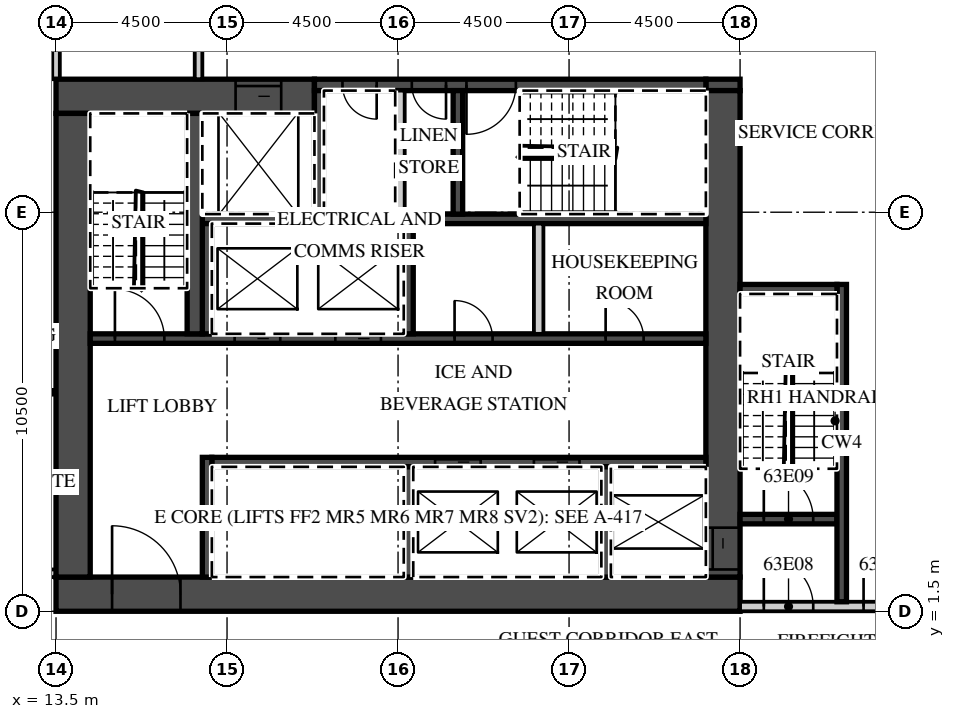
"""IFC4 building model, lengths in metres.
Left out: names, types, materials, properties, quantities, classifications, styles, units other than length and angle.
Written with IfcOpenShell. Run it as: python <this file> out.ifc"""

import sys

from ifc_helpers import new_model, si_unit, direction, frame, frame_2d, origin, place, context, subcontext, project, spatial, rectangle, extrude, element, fill, save


model = new_model("IFC4")
c1 = context("Model", 3, precision=1e-05, world=origin(), true_north=direction((0.0, 1.0)))
c2 = subcontext(c1, "Body", "Model", "MODEL_VIEW")
j1 = project(units=[si_unit("LENGTHUNIT", "METRE"), si_unit("PLANEANGLEUNIT", "RADIAN")], contexts=[c1])
p1 = place(None, origin())
s1 = spatial("IfcSite", under=j1, at=p1, CompositionType="ELEMENT")
p2 = place(p1, origin())
s2 = spatial("IfcBuilding", under=s1, at=p2, CompositionType="ELEMENT")
p3 = place(p2, frame((0.0, 0.0, 254.0)))
s3 = spatial("IfcBuildingStorey", under=s2, at=p3, CompositionType="ELEMENT", Elevation=254.0)
p4 = place(p3, frame((13.5, 15.5, 0.0), z_axis=(0.0, 0.0, 1.0), x_axis=(0.0, 1.0, 0.0)))
e1 = element("IfcWall", 1, at=p4, inside=s3, PredefinedType="PARTITIONING", context=c2, shape_type="SweptSolid", body=[
    extrude(rectangle(XDim=5.436, YDim=0.2, at=frame_2d((2.718, 0.0))), origin(), (0.0, 0.0, 1.0), 3.0),
])
p5 = place(p3, frame((-13.5, 2.5, 0.0), z_axis=(0.0, 0.0, 1.0), x_axis=(1.0, 0.0, 0.0)))
e2 = element("IfcWall", 2, at=p5, inside=s3, PredefinedType="PARTITIONING", context=c2, shape_type="SweptSolid", body=[
    extrude(rectangle(XDim=27.0, YDim=0.2, at=frame_2d((13.5, 0.0))), origin(), (0.0, 0.0, 1.0), 3.0),
])
p6 = place(p5, frame((0.575, 0.0, 0.0)))
e3 = element("IfcOpeningElement", 3, at=p6, cuts=e2, PredefinedType="OPENING", context=c2, shape_type="SweptSolid", body=[
    extrude(rectangle(XDim=1.0, YDim=2.1, at=frame_2d((0.5, 1.05))), frame((0.0, 0.11, 0.0), z_axis=(0.0, -1.0, 0.0), x_axis=(1.0, 0.0, 0.0)), (0.0, 0.0, 1.0), 0.22),
])
p7 = place(p5, frame((7.45, 0.0, 0.0)))
e4 = element("IfcOpeningElement", 4, at=p7, cuts=e2, PredefinedType="OPENING", context=c2, shape_type="SweptSolid", body=[
    extrude(rectangle(XDim=1.0, YDim=2.1, at=frame_2d((0.5, 1.05))), frame((0.0, 0.11, 0.0), z_axis=(0.0, -1.0, 0.0), x_axis=(1.0, 0.0, 0.0)), (0.0, 0.0, 1.0), 0.22),
])
p8 = place(p5, frame((11.925, 0.0, 0.0)))
e5 = element("IfcOpeningElement", 5, at=p8, cuts=e2, PredefinedType="OPENING", context=c2, shape_type="SweptSolid", body=[
    extrude(rectangle(XDim=1.0, YDim=2.1, at=frame_2d((0.5, 1.05))), frame((0.0, 0.11, 0.0), z_axis=(0.0, -1.0, 0.0), x_axis=(1.0, 0.0, 0.0)), (0.0, 0.0, 1.0), 0.22),
])
p9 = place(p5, frame((18.862, 0.0, 0.0)))
e6 = element("IfcOpeningElement", 6, at=p9, cuts=e2, PredefinedType="OPENING", context=c2, shape_type="SweptSolid", body=[
    extrude(rectangle(XDim=1.2, YDim=2.1, at=frame_2d((0.6, 1.05))), frame((0.0, 0.11, 0.0), z_axis=(0.0, -1.0, 0.0), x_axis=(1.0, 0.0, 0.0)), (0.0, 0.0, 1.0), 0.22),
])
p10 = place(p5, frame((23.075, 0.0, 0.0)))
e7 = element("IfcOpeningElement", 7, at=p10, cuts=e2, PredefinedType="OPENING", context=c2, shape_type="SweptSolid", body=[
    extrude(rectangle(XDim=1.0, YDim=2.1, at=frame_2d((0.5, 1.05))), frame((0.0, 0.11, 0.0), z_axis=(0.0, -1.0, 0.0), x_axis=(1.0, 0.0, 0.0)), (0.0, 0.0, 1.0), 0.22),
])
p11 = place(p3, frame((13.5, 1.95, 0.0), z_axis=(0.0, 0.0, 1.0), x_axis=(1.0, 0.0, 0.0)))
e8 = element("IfcWall", 8, at=p11, inside=s3, PredefinedType="SHEAR", context=c2, shape_type="SweptSolid", body=[
    extrude(rectangle(XDim=18.0, YDim=0.9, at=frame_2d((9.0, 0.0))), origin(), (0.0, 0.0, 1.0), 3.0),
])
p12 = place(p11, frame((1.475, 0.0, 0.0)))
e9 = element("IfcOpeningElement", 9, at=p12, cuts=e8, PredefinedType="OPENING", context=c2, shape_type="SweptSolid", body=[
    extrude(rectangle(XDim=1.8, YDim=2.1, at=frame_2d((0.9, 1.05))), frame((0.0, 0.46, 0.0), z_axis=(0.0, -1.0, 0.0), x_axis=(1.0, 0.0, 0.0)), (0.0, 0.0, 1.0), 0.92),
])
p13 = place(p3, frame((13.5, 15.05, 0.0), z_axis=(0.0, 0.0, 1.0), x_axis=(1.0, 0.0, 0.0)))
e10 = element("IfcWall", 10, at=p13, inside=s3, PredefinedType="SHEAR", context=c2, shape_type="SweptSolid", body=[
    extrude(rectangle(XDim=6.8, YDim=0.9, at=frame_2d((3.4, 0.0))), origin(), (0.0, 0.0, 1.0), 3.0),
])
p14 = place(p13, frame((4.725, 0.0, 0.0)))
e11 = element("IfcOpeningElement", 11, at=p14, cuts=e10, PredefinedType="OPENING", context=c2, shape_type="SweptSolid", body=[
    extrude(rectangle(XDim=1.2, YDim=2.1, at=frame_2d((0.6, 1.05))), frame((0.0, 0.46, 0.0), z_axis=(0.0, -1.0, 0.0), x_axis=(1.0, 0.0, 0.0)), (0.0, 0.0, 1.0), 0.92),
])
p15 = place(p3, frame((30.6, 15.35, 0.0), z_axis=(0.0, 0.0, 1.0), x_axis=(1.0, 0.0, 0.0)))
e12 = element("IfcWall", 12, at=p15, inside=s3, PredefinedType="SHEAR", context=c2, shape_type="SweptSolid", body=[
    extrude(rectangle(XDim=0.9, YDim=0.3, at=frame_2d((0.45, 0.0))), origin(), (0.0, 0.0, 1.0), 3.0),
])
p16 = place(p3, frame((20.3, 15.35, 0.0), z_axis=(0.0, 0.0, 1.0), x_axis=(1.0, 0.0, 0.0)))
e13 = element("IfcWall", 13, at=p16, inside=s3, PredefinedType="SHEAR", context=c2, shape_type="SweptSolid", body=[
    extrude(rectangle(XDim=10.3, YDim=0.3, at=frame_2d((5.15, 0.0))), origin(), (0.0, 0.0, 1.0), 3.0),
])
p17 = place(p16, frame((4.0, 0.0, 0.0)))
e14 = element("IfcOpeningElement", 14, at=p17, cuts=e13, PredefinedType="OPENING", context=c2, shape_type="SweptSolid", body=[
    extrude(rectangle(XDim=1.3, YDim=2.1, at=frame_2d((0.65, 1.05))), frame((0.0, 0.16, 0.0), z_axis=(0.0, -1.0, 0.0), x_axis=(1.0, 0.0, 0.0)), (0.0, 0.0, 1.0), 0.32),
])
p18 = place(p16, frame((2.562, 0.0, 0.0)))
e15 = element("IfcOpeningElement", 15, at=p18, cuts=e13, PredefinedType="OPENING", context=c2, shape_type="SweptSolid", body=[
    extrude(rectangle(XDim=0.9, YDim=2.1, at=frame_2d((0.45, 1.05))), frame((0.0, 0.16, 0.0), z_axis=(0.0, -1.0, 0.0), x_axis=(1.0, 0.0, 0.0)), (0.0, 0.0, 1.0), 0.32),
])
p19 = place(p16, frame((0.738, 0.0, 0.0)))
e16 = element("IfcOpeningElement", 16, at=p19, cuts=e13, PredefinedType="OPENING", context=c2, shape_type="SweptSolid", body=[
    extrude(rectangle(XDim=0.9, YDim=2.1, at=frame_2d((0.45, 1.05))), frame((0.0, 0.16, 0.0), z_axis=(0.0, -1.0, 0.0), x_axis=(1.0, 0.0, 0.0)), (0.0, 0.0, 1.0), 0.32),
])
p20 = place(p3, frame((31.05, 2.4, 0.0), z_axis=(0.0, 0.0, 1.0), x_axis=(0.0, 1.0, 0.0)))
e17 = element("IfcWall", 17, at=p20, inside=s3, PredefinedType="SHEAR", context=c2, shape_type="SweptSolid", body=[
    extrude(rectangle(XDim=12.8, YDim=0.9, at=frame_2d((6.4, 0.0))), origin(), (0.0, 0.0, 1.0), 3.0),
])
p21 = place(p20, frame((0.2, 0.0, 0.0)))
e18 = element("IfcOpeningElement", 18, at=p21, cuts=e17, PredefinedType="OPENING", context=c2, shape_type="SweptSolid", body=[
    extrude(rectangle(XDim=1.1, YDim=2.1, at=frame_2d((0.55, 1.05))), frame((0.0, 0.46, 0.0), z_axis=(0.0, -1.0, 0.0), x_axis=(1.0, 0.0, 0.0)), (0.0, 0.0, 1.0), 0.92),
])
p22 = place(p3, frame((13.95, 2.4, 0.0), z_axis=(0.0, 0.0, 1.0), x_axis=(0.0, 1.0, 0.0)))
e19 = element("IfcWall", 19, at=p22, inside=s3, PredefinedType="SHEAR", context=c2, shape_type="SweptSolid", body=[
    extrude(rectangle(XDim=12.2, YDim=0.9, at=frame_2d((6.1, 0.0))), origin(), (0.0, 0.0, 1.0), 3.0),
])
p23 = place(p3, frame((17.6, 5.425, 0.0), z_axis=(0.0, 0.0, 1.0), x_axis=(1.0, 0.0, 0.0)))
e20 = element("IfcWall", 20, at=p23, inside=s3, PredefinedType="SHEAR", context=c2, shape_type="SweptSolid", body=[
    extrude(rectangle(XDim=13.0, YDim=0.25, at=frame_2d((6.5, 0.0))), origin(), (0.0, 0.0, 1.0), 3.0),
])
p24 = place(p23, frame((8.475, 0.0, 0.0)))
e21 = element("IfcOpeningElement", 21, at=p24, cuts=e20, PredefinedType="OPENING", context=c2, shape_type="SweptSolid", body=[
    extrude(rectangle(XDim=1.2, YDim=2.1, at=frame_2d((0.6, 1.05))), frame((0.0, 0.135, 0.0), z_axis=(0.0, -1.0, 0.0), x_axis=(1.0, 0.0, 0.0)), (0.0, 0.0, 1.0), 0.27),
])
p25 = place(p23, frame((5.875, 0.0, 0.0)))
e22 = element("IfcOpeningElement", 22, at=p25, cuts=e20, PredefinedType="OPENING", context=c2, shape_type="SweptSolid", body=[
    extrude(rectangle(XDim=1.2, YDim=2.1, at=frame_2d((0.6, 1.05))), frame((0.0, 0.135, 0.0), z_axis=(0.0, -1.0, 0.0), x_axis=(1.0, 0.0, 0.0)), (0.0, 0.0, 1.0), 0.27),
])
p26 = place(p3, frame((17.475, 2.4, 0.0), z_axis=(0.0, 0.0, 1.0), x_axis=(0.0, 1.0, 0.0)))
e23 = element("IfcWall", 23, at=p26, inside=s3, PredefinedType="SHEAR", context=c2, shape_type="SweptSolid", body=[
    extrude(rectangle(XDim=3.15, YDim=0.25, at=frame_2d((1.575, 0.0))), origin(), (0.0, 0.0, 1.0), 3.0),
])
for number, where, z_axis, x_axis in (
    (24, (27.975, 2.4, 0.0), (0.0, 0.0, 1.0), (0.0, 1.0, 0.0)),
    (25, (22.775, 2.4, 0.0), (0.0, 0.0, 1.0), (0.0, 1.0, 0.0)),
):
    element("IfcWall", number, at=place(p3, frame(where, z_axis=z_axis, x_axis=x_axis)), inside=s3, PredefinedType="SHEAR", context=c2, shape_type="SweptSolid", body=[
        extrude(rectangle(XDim=2.9, YDim=0.25, at=frame_2d((1.45, 0.0))), origin(), (0.0, 0.0, 1.0), 3.0),
    ])
p27 = place(p3, frame((14.4, 8.675, 0.0), z_axis=(0.0, 0.0, 1.0), x_axis=(1.0, 0.0, 0.0)))
e26 = element("IfcWall", 26, at=p27, inside=s3, PredefinedType="SHEAR", context=c2, shape_type="SweptSolid", body=[
    extrude(rectangle(XDim=16.2, YDim=0.25, at=frame_2d((8.1, 0.0))), origin(), (0.0, 0.0, 1.0), 3.0),
])
p28 = place(p27, frame((6.45, 0.0, 0.0)))
e27 = element("IfcOpeningElement", 27, at=p28, cuts=e26, PredefinedType="OPENING", context=c2, shape_type="SweptSolid", body=[
    extrude(rectangle(XDim=1.2, YDim=2.1, at=frame_2d((0.6, 1.05))), frame((0.0, 0.135, 0.0), z_axis=(0.0, -1.0, 0.0), x_axis=(1.0, 0.0, 0.0)), (0.0, 0.0, 1.0), 0.27),
])
p29 = place(p27, frame((3.8, 0.0, 0.0)))
e28 = element("IfcOpeningElement", 28, at=p29, cuts=e26, PredefinedType="OPENING", context=c2, shape_type="SweptSolid", body=[
    extrude(rectangle(XDim=1.2, YDim=2.1, at=frame_2d((0.6, 1.05))), frame((0.0, 0.135, 0.0), z_axis=(0.0, -1.0, 0.0), x_axis=(1.0, 0.0, 0.0)), (0.0, 0.0, 1.0), 0.27),
])
p30 = place(p27, frame((0.65, 0.0, 0.0)))
e29 = element("IfcOpeningElement", 29, at=p30, cuts=e26, PredefinedType="OPENING", context=c2, shape_type="SweptSolid", body=[
    extrude(rectangle(XDim=1.3, YDim=2.1, at=frame_2d((0.65, 1.05))), frame((0.0, 0.135, 0.0), z_axis=(0.0, -1.0, 0.0), x_axis=(1.0, 0.0, 0.0)), (0.0, 0.0, 1.0), 0.27),
])
p31 = place(p27, frame((13.562, 0.0, 0.0)))
e30 = element("IfcOpeningElement", 30, at=p31, cuts=e26, PredefinedType="OPENING", context=c2, shape_type="SweptSolid", body=[
    extrude(rectangle(XDim=1.0, YDim=2.1, at=frame_2d((0.5, 1.05))), frame((0.0, 0.135, 0.0), z_axis=(0.0, -1.0, 0.0), x_axis=(1.0, 0.0, 0.0)), (0.0, 0.0, 1.0), 0.27),
])
p32 = place(p27, frame((9.587, 0.0, 0.0)))
e31 = element("IfcOpeningElement", 31, at=p32, cuts=e26, PredefinedType="OPENING", context=c2, shape_type="SweptSolid", body=[
    extrude(rectangle(XDim=1.0, YDim=2.1, at=frame_2d((0.5, 1.05))), frame((0.0, 0.135, 0.0), z_axis=(0.0, -1.0, 0.0), x_axis=(1.0, 0.0, 0.0)), (0.0, 0.0, 1.0), 0.27),
])
p33 = place(p3, frame((17.35, 11.825, 0.0), z_axis=(0.0, 0.0, 1.0), x_axis=(1.0, 0.0, 0.0)))
e32 = element("IfcWall", 32, at=p33, inside=s3, PredefinedType="SHEAR", context=c2, shape_type="SweptSolid", body=[
    extrude(rectangle(XDim=13.25, YDim=0.25, at=frame_2d((6.625, 0.0))), origin(), (0.0, 0.0, 1.0), 3.0),
])
for number, where, z_axis, x_axis in (
    (33, (17.475, 8.8, 0.0), (0.0, 0.0, 1.0), (0.0, 1.0, 0.0)),
    (34, (22.775, 8.8, 0.0), (0.0, 0.0, 1.0), (0.0, 1.0, 0.0)),
):
    element("IfcWall", number, at=place(p3, frame(where, z_axis=z_axis, x_axis=x_axis)), inside=s3, PredefinedType="SHEAR", context=c2, shape_type="SweptSolid", body=[
        extrude(rectangle(XDim=2.9, YDim=0.25, at=frame_2d((1.45, 0.0))), origin(), (0.0, 0.0, 1.0), 3.0),
    ])
p34 = place(p3, frame((26.2, 8.8, 0.0), z_axis=(0.0, 0.0, 1.0), x_axis=(0.0, 1.0, 0.0)))
e35 = element("IfcWall", 35, at=p34, inside=s3, PredefinedType="PARTITIONING", context=c2, shape_type="SweptSolid", body=[
    extrude(rectangle(XDim=2.9, YDim=0.25, at=frame_2d((1.45, 0.0))), origin(), (0.0, 0.0, 1.0), 3.0),
])
p35 = place(p3, frame((17.15, 8.8, 0.0), z_axis=(0.0, 0.0, 1.0), x_axis=(0.0, 1.0, 0.0)))
e36 = element("IfcWall", 36, at=p35, inside=s3, PredefinedType="SHEAR", context=c2, shape_type="SweptSolid", body=[
    extrude(rectangle(XDim=5.8, YDim=0.4, at=frame_2d((2.9, 0.0))), origin(), (0.0, 0.0, 1.0), 3.0),
])
for number, where, z_axis, x_axis in (
    (37, (20.425, 11.95, 0.0), (0.0, 0.0, 1.0), (0.0, 1.0, 0.0)),
    (38, (24.075, 11.95, 0.0), (0.0, 0.0, 1.0), (0.0, 1.0, 0.0)),
):
    element("IfcWall", number, at=place(p3, frame(where, z_axis=z_axis, x_axis=x_axis)), inside=s3, PredefinedType="SHEAR", context=c2, shape_type="SweptSolid", body=[
        extrude(rectangle(XDim=3.25, YDim=0.25, at=frame_2d((1.625, 0.0))), origin(), (0.0, 0.0, 1.0), 3.0),
    ])
p36 = place(p3, frame((22.55, 11.95, 0.0), z_axis=(0.0, 0.0, 1.0), x_axis=(0.0, 1.0, 0.0)))
e39 = element("IfcWall", 39, at=p36, inside=s3, PredefinedType="PARTITIONING", context=c2, shape_type="SweptSolid", body=[
    extrude(rectangle(XDim=3.25, YDim=0.25, at=frame_2d((1.625, 0.0))), origin(), (0.0, 0.0, 1.0), 3.0),
])
p37 = place(p3, frame((31.5, 1.625, 0.0), z_axis=(0.0, 0.0, 1.0), x_axis=(1.0, 0.0, 0.0)))
e40 = element("IfcWall", 40, at=p37, inside=s3, PredefinedType="PARTITIONING", context=c2, shape_type="SweptSolid", body=[
    extrude(rectangle(XDim=11.04, YDim=0.25, at=frame_2d((5.52, 0.0))), origin(), (0.0, 0.0, 1.0), 3.0),
])
p38 = place(p37, frame((0.625, 0.0, 0.0)))
e41 = element("IfcOpeningElement", 41, at=p38, cuts=e40, PredefinedType="OPENING", context=c2, shape_type="SweptSolid", body=[
    extrude(rectangle(XDim=1.3, YDim=2.1, at=frame_2d((0.65, 1.05))), frame((0.0, 0.135, 0.0), z_axis=(0.0, -1.0, 0.0), x_axis=(1.0, 0.0, 0.0)), (0.0, 0.0, 1.0), 0.27),
])
p39 = place(p37, frame((3.25, 0.0, 0.0)))
e42 = element("IfcOpeningElement", 42, at=p39, cuts=e40, PredefinedType="OPENING", context=c2, shape_type="SweptSolid", body=[
    extrude(rectangle(XDim=1.1, YDim=2.1, at=frame_2d((0.55, 1.05))), frame((0.0, 0.135, 0.0), z_axis=(0.0, -1.0, 0.0), x_axis=(1.0, 0.0, 0.0)), (0.0, 0.0, 1.0), 0.27),
])
p40 = place(p3, frame((31.5, 3.925, 0.0), z_axis=(0.0, 0.0, 1.0), x_axis=(1.0, 0.0, 0.0)))
e43 = element("IfcWall", 43, at=p40, inside=s3, PredefinedType="SHEAR", context=c2, shape_type="SweptSolid", body=[
    extrude(rectangle(XDim=2.55, YDim=0.25, at=frame_2d((1.275, 0.0))), origin(), (0.0, 0.0, 1.0), 3.0),
])
p41 = place(p40, frame((0.625, 0.0, 0.0)))
e44 = element("IfcOpeningElement", 44, at=p41, cuts=e43, PredefinedType="OPENING", context=c2, shape_type="SweptSolid", body=[
    extrude(rectangle(XDim=1.3, YDim=2.1, at=frame_2d((0.65, 1.05))), frame((0.0, 0.135, 0.0), z_axis=(0.0, -1.0, 0.0), x_axis=(1.0, 0.0, 0.0)), (0.0, 0.0, 1.0), 0.27),
])
p42 = place(p3, frame((34.175, 1.75, 0.0), z_axis=(0.0, 0.0, 1.0), x_axis=(0.0, 1.0, 0.0)))
e45 = element("IfcWall", 45, at=p42, inside=s3, PredefinedType="SHEAR", context=c2, shape_type="SweptSolid", body=[
    extrude(rectangle(XDim=8.35, YDim=0.25, at=frame_2d((4.175, 0.0))), origin(), (0.0, 0.0, 1.0), 3.0),
])
p43 = place(p3, frame((31.5, 9.975, 0.0), z_axis=(0.0, 0.0, 1.0), x_axis=(1.0, 0.0, 0.0)))
e46 = element("IfcWall", 46, at=p43, inside=s3, PredefinedType="SHEAR", context=c2, shape_type="SweptSolid", body=[
    extrude(rectangle(XDim=2.55, YDim=0.25, at=frame_2d((1.275, 0.0))), origin(), (0.0, 0.0, 1.0), 3.0),
])
p44 = place(p3, frame((17.25, 15.5, 0.0), z_axis=(0.0, 0.0, 1.0), x_axis=(0.0, 1.0, 0.0)))
e47 = element("IfcWall", 47, at=p44, inside=s3, PredefinedType="PARTITIONING", context=c2, shape_type="SweptSolid", body=[
    extrude(rectangle(XDim=2.2, YDim=0.2, at=frame_2d((1.1, 0.0))), origin(), (0.0, 0.0, 1.0), 3.0),
])
p45 = place(p28, origin())
e48 = element("IfcDoor", 48, at=p45, inside=s3, OperationType="SLIDING_TO_LEFT", PredefinedType="DOOR", context=c2, shape_type="SweptSolid", body=[
    extrude(rectangle(XDim=1.2, YDim=2.1, at=frame_2d((0.6, 1.05))), frame((0.0, 0.025, 0.0), z_axis=(0.0, -1.0, 0.0), x_axis=(1.0, 0.0, 0.0)), (0.0, 0.0, 1.0), 0.05),
])
fill(e27, e48)
p46 = place(p29, origin())
e49 = element("IfcDoor", 49, at=p46, inside=s3, OperationType="SLIDING_TO_RIGHT", PredefinedType="DOOR", context=c2, shape_type="SweptSolid", body=[
    extrude(rectangle(XDim=1.2, YDim=2.1, at=frame_2d((0.6, 1.05))), frame((0.0, 0.025, 0.0), z_axis=(0.0, -1.0, 0.0), x_axis=(1.0, 0.0, 0.0)), (0.0, 0.0, 1.0), 0.05),
])
fill(e28, e49)
p47 = place(p24, origin())
e50 = element("IfcDoor", 50, at=p47, inside=s3, OperationType="SLIDING_TO_LEFT", PredefinedType="DOOR", context=c2, shape_type="SweptSolid", body=[
    extrude(rectangle(XDim=1.2, YDim=2.1, at=frame_2d((0.6, 1.05))), frame((0.0, 0.025, 0.0), z_axis=(0.0, -1.0, 0.0), x_axis=(1.0, 0.0, 0.0)), (0.0, 0.0, 1.0), 0.05),
])
fill(e21, e50)
p48 = place(p25, origin())
e51 = element("IfcDoor", 51, at=p48, inside=s3, OperationType="SLIDING_TO_RIGHT", PredefinedType="DOOR", context=c2, shape_type="SweptSolid", body=[
    extrude(rectangle(XDim=1.2, YDim=2.1, at=frame_2d((0.6, 1.05))), frame((0.0, 0.025, 0.0), z_axis=(0.0, -1.0, 0.0), x_axis=(1.0, 0.0, 0.0)), (0.0, 0.0, 1.0), 0.05),
])
fill(e22, e51)
p49 = place(p14, origin())
e52 = element("IfcDoor", 52, at=p49, inside=s3, OperationType="SLIDING_TO_LEFT", PredefinedType="DOOR", context=c2, shape_type="SweptSolid", body=[
    extrude(rectangle(XDim=1.2, YDim=2.1, at=frame_2d((0.6, 1.05))), frame((0.0, 0.025, 0.0), z_axis=(0.0, -1.0, 0.0), x_axis=(1.0, 0.0, 0.0)), (0.0, 0.0, 1.0), 0.05),
])
fill(e11, e52)
p50 = place(p21, origin())
e53 = element("IfcDoor", 53, at=p50, inside=s3, OperationType="SLIDING_TO_LEFT", PredefinedType="DOOR", context=c2, shape_type="SweptSolid", body=[
    extrude(rectangle(XDim=1.1, YDim=2.1, at=frame_2d((0.55, 1.05))), frame((0.0, 0.025, 0.0), z_axis=(0.0, -1.0, 0.0), x_axis=(1.0, 0.0, 0.0)), (0.0, 0.0, 1.0), 0.05),
])
fill(e18, e53)
p51 = place(p12, origin())
e54 = element("IfcDoor", 54, at=p51, inside=s3, OperationType="DOUBLE_DOOR_DOUBLE_SWING", PredefinedType="DOOR", context=c2, shape_type="SweptSolid", body=[
    extrude(rectangle(XDim=1.8, YDim=2.1, at=frame_2d((0.9, 1.05))), frame((0.0, 0.025, 0.0), z_axis=(0.0, -1.0, 0.0), x_axis=(1.0, 0.0, 0.0)), (0.0, 0.0, 1.0), 0.05),
])
fill(e9, e54)
p52 = place(p38, origin())
e55 = element("IfcDoor", 55, at=p52, inside=s3, OperationType="SINGLE_SWING_LEFT", PredefinedType="DOOR", context=c2, shape_type="SweptSolid", body=[
    extrude(rectangle(XDim=1.3, YDim=2.1, at=frame_2d((0.65, 1.05))), frame((0.0, 0.025, 0.0), z_axis=(0.0, -1.0, 0.0), x_axis=(1.0, 0.0, 0.0)), (0.0, 0.0, 1.0), 0.05),
])
fill(e41, e55)
p53 = place(p41, origin())
e56 = element("IfcDoor", 56, at=p53, inside=s3, OperationType="SINGLE_SWING_LEFT", PredefinedType="DOOR", context=c2, shape_type="SweptSolid", body=[
    extrude(rectangle(XDim=1.3, YDim=2.1, at=frame_2d((0.65, 1.05))), frame((0.0, 0.025, 0.0), z_axis=(0.0, -1.0, 0.0), x_axis=(1.0, 0.0, 0.0)), (0.0, 0.0, 1.0), 0.05),
])
fill(e44, e56)
p54 = place(p39, origin())
e57 = element("IfcDoor", 57, at=p54, inside=s3, OperationType="SINGLE_SWING_LEFT", PredefinedType="DOOR", context=c2, shape_type="SweptSolid", body=[
    extrude(rectangle(XDim=1.1, YDim=2.1, at=frame_2d((0.55, 1.05))), frame((0.0, 0.025, 0.0), z_axis=(0.0, -1.0, 0.0), x_axis=(1.0, 0.0, 0.0)), (0.0, 0.0, 1.0), 0.05),
])
fill(e42, e57)
p55 = place(p30, origin())
e58 = element("IfcDoor", 58, at=p55, inside=s3, OperationType="SINGLE_SWING_LEFT", PredefinedType="DOOR", context=c2, shape_type="SweptSolid", body=[
    extrude(rectangle(XDim=1.3, YDim=2.1, at=frame_2d((0.65, 1.05))), frame((0.0, 0.025, 0.0), z_axis=(0.0, -1.0, 0.0), x_axis=(1.0, 0.0, 0.0)), (0.0, 0.0, 1.0), 0.05),
])
fill(e29, e58)
p56 = place(p17, origin())
e59 = element("IfcDoor", 59, at=p56, inside=s3, OperationType="SINGLE_SWING_LEFT", PredefinedType="DOOR", context=c2, shape_type="SweptSolid", body=[
    extrude(rectangle(XDim=1.3, YDim=2.1, at=frame_2d((0.65, 1.05))), frame((0.0, 0.025, 0.0), z_axis=(0.0, -1.0, 0.0), x_axis=(1.0, 0.0, 0.0)), (0.0, 0.0, 1.0), 0.05),
])
fill(e14, e59)
p57 = place(p18, origin())
e60 = element("IfcDoor", 60, at=p57, inside=s3, OperationType="SINGLE_SWING_RIGHT", PredefinedType="DOOR", context=c2, shape_type="SweptSolid", body=[
    extrude(rectangle(XDim=0.9, YDim=2.1, at=frame_2d((0.45, 1.05))), frame((0.0, 0.025, 0.0), z_axis=(0.0, -1.0, 0.0), x_axis=(1.0, 0.0, 0.0)), (0.0, 0.0, 1.0), 0.05),
])
fill(e15, e60)
p58 = place(p19, origin())
e61 = element("IfcDoor", 61, at=p58, inside=s3, OperationType="SINGLE_SWING_RIGHT", PredefinedType="DOOR", context=c2, shape_type="SweptSolid", body=[
    extrude(rectangle(XDim=0.9, YDim=2.1, at=frame_2d((0.45, 1.05))), frame((0.0, 0.025, 0.0), z_axis=(0.0, -1.0, 0.0), x_axis=(1.0, 0.0, 0.0)), (0.0, 0.0, 1.0), 0.05),
])
fill(e16, e61)
p59 = place(p31, origin())
e62 = element("IfcDoor", 62, at=p59, inside=s3, OperationType="SINGLE_SWING_LEFT", PredefinedType="DOOR", context=c2, shape_type="SweptSolid", body=[
    extrude(rectangle(XDim=1.0, YDim=2.1, at=frame_2d((0.5, 1.05))), frame((0.0, 0.025, 0.0), z_axis=(0.0, -1.0, 0.0), x_axis=(1.0, 0.0, 0.0)), (0.0, 0.0, 1.0), 0.05),
])
fill(e30, e62)
p60 = place(p32, origin())
e63 = element("IfcDoor", 63, at=p60, inside=s3, OperationType="SINGLE_SWING_LEFT", PredefinedType="DOOR", context=c2, shape_type="SweptSolid", body=[
    extrude(rectangle(XDim=1.0, YDim=2.1, at=frame_2d((0.5, 1.05))), frame((0.0, 0.025, 0.0), z_axis=(0.0, -1.0, 0.0), x_axis=(1.0, 0.0, 0.0)), (0.0, 0.0, 1.0), 0.05),
])
fill(e31, e63)
save(model, sys.argv[1])
